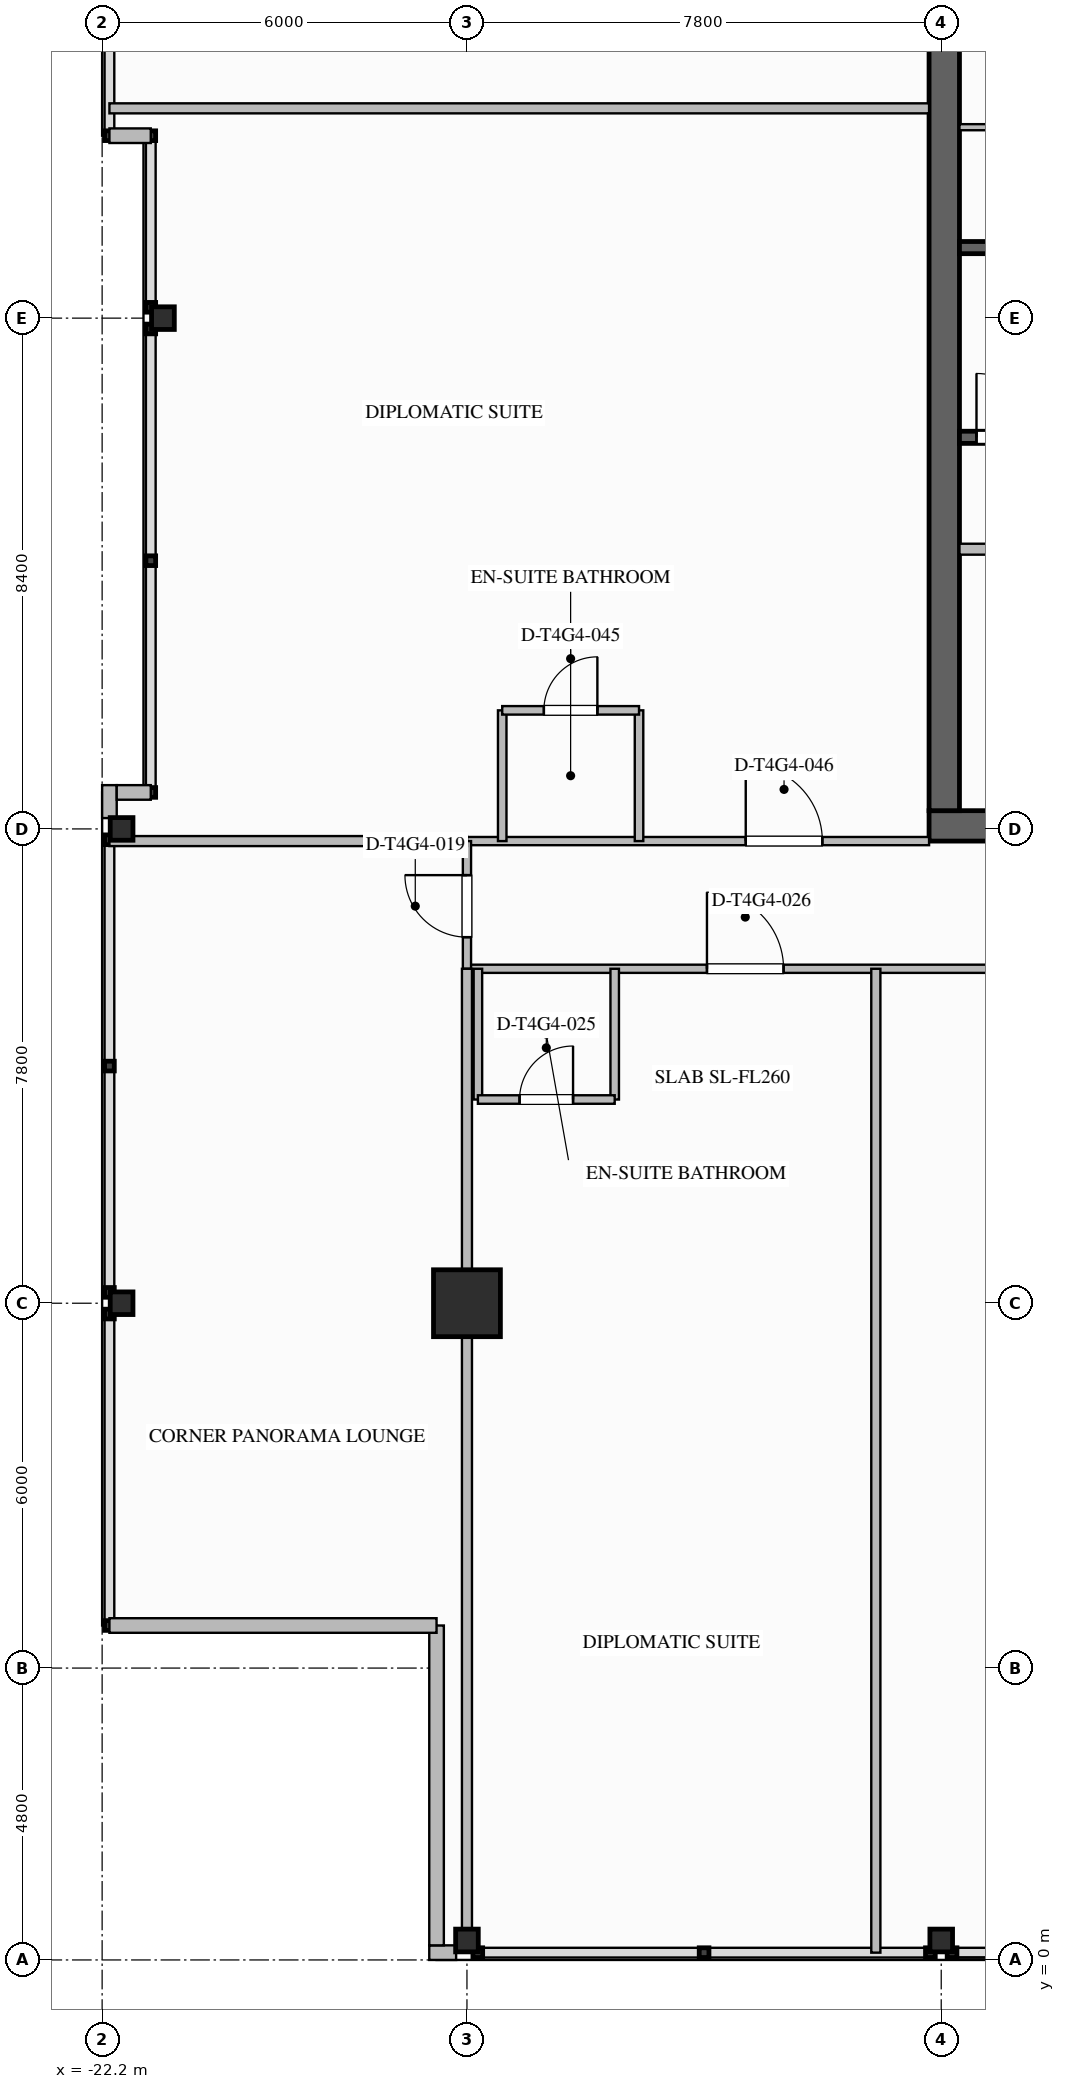
"""IFC4 building model, lengths in metres.
Left out: names, types, materials, properties, quantities, classifications, styles, units other than length and angle.
Written with IfcOpenShell. Run it as: python <this file> out.ifc"""

import sys

from ifc_helpers import new_model, si_unit, direction, frame, frame_2d, origin, origin_2d, place, context, subcontext, project, spatial, rectangle, i_section, extrude, element, fill, save


model = new_model("IFC4")
c1 = context("Model", 3, precision=1e-05, world=origin(), true_north=direction((0.0, 1.0)))
c2 = subcontext(c1, "Body", "Model", "MODEL_VIEW")
j1 = project(units=[si_unit("LENGTHUNIT", "METRE"), si_unit("PLANEANGLEUNIT", "RADIAN")], contexts=[c1])
p1 = place(None, origin())
s1 = spatial("IfcSite", under=j1, at=p1, CompositionType="ELEMENT")
p2 = place(p1, origin())
s2 = spatial("IfcBuilding", under=s1, at=p2, CompositionType="ELEMENT")
p3 = place(p2, frame((0.0, 0.0, 237.5)))
s3 = spatial("IfcBuildingStorey", under=s2, at=p3, CompositionType="ELEMENT", Elevation=237.5)
p4 = place(p3, frame((8.6, 18.65, 0.0), z_axis=(0.0, 0.0, 1.0), x_axis=(-1.0, 0.0, 0.0)))
e1 = element("IfcWall", 1, at=p4, inside=s3, PredefinedType="SHEAR", context=c2, shape_type="SweptSolid", body=[
    extrude(rectangle(XDim=17.2, YDim=0.5, at=frame_2d((8.6, 0.0))), origin(), (0.0, 0.0, 1.0), 3.6),
])
p5 = place(p3, frame((-8.35, 18.9, 0.0), z_axis=(0.0, 0.0, 1.0), x_axis=(0.0, 1.0, 0.0)))
e2 = element("IfcWall", 2, at=p5, inside=s3, PredefinedType="SHEAR", context=c2, shape_type="SweptSolid", body=[
    extrude(rectangle(XDim=16.2, YDim=0.5, at=frame_2d((8.1, 0.0))), origin(), (0.0, 0.0, 1.0), 3.6),
])
p6 = place(p3, frame((-16.2, 10.8, 0.0), z_axis=(0.0, 0.0, 1.0), x_axis=(1.0, 0.0, 0.0)))
e3 = element("IfcColumn", 3, at=p6, inside=s3, PredefinedType="COLUMN", context=c2, shape_type="SweptSolid", body=[
    extrude(rectangle(XDim=1.1, YDim=1.1, at=origin_2d()), origin(), (0.0, 0.0, 1.0), 3.6),
])
for number, where, z_axis, x_axis in (
    (4, (-21.88, 10.8, 0.0), (0.0, 0.0, 1.0), (1.0, 0.0, 0.0)),
    (5, (-21.88, 18.6, 0.0), (0.0, 0.0, 1.0), (1.0, 0.0, 0.0)),
    (6, (-21.2, 27.0, 0.0), (0.0, 0.0, 1.0), (1.0, 0.0, 0.0)),
    (7, (-16.2, 0.32, 0.0), (0.0, 0.0, 1.0), (0.0, 1.0, 0.0)),
    (8, (-8.4, 0.32, 0.0), (0.0, 0.0, 1.0), (0.0, 1.0, 0.0)),
):
    element("IfcColumn", number, at=place(p3, frame(where, z_axis=z_axis, x_axis=x_axis)), inside=s3, PredefinedType="COLUMN", context=c2, shape_type="SweptSolid", body=[
        extrude(i_section(OverallWidth=0.374, OverallDepth=0.372, WebThickness=0.016, FlangeThickness=0.026, FilletRadius=0.025, at=origin_2d()), origin(), (0.0, 0.0, 1.0), 3.597),
    ])
p7 = place(p3, frame((-22.08, 18.778, 0.0), z_axis=(0.0, 0.0, 1.0), x_axis=(0.0, 1.0, 0.0)))
e9 = element("IfcWall", 9, at=p7, inside=s3, PredefinedType="STANDARD", context=c2, shape_type="SweptSolid", body=[
    extrude(rectangle(XDim=0.542, YDim=0.24, at=frame_2d((0.271, 0.0))), origin(), (0.0, 0.0, 1.0), 3.34),
])
p8 = place(p3, frame((-16.378, 0.12, 0.0), z_axis=(0.0, 0.0, 1.0), x_axis=(-1.0, 0.0, 0.0)))
e10 = element("IfcWall", 10, at=p8, inside=s3, PredefinedType="STANDARD", context=c2, shape_type="SweptSolid", body=[
    extrude(rectangle(XDim=0.442, YDim=0.24, at=frame_2d((0.221, 0.0))), origin(), (0.0, 0.0, 1.0), 3.34),
])
p9 = place(p3, frame((-16.7, 0.24, 0.0), z_axis=(0.0, 0.0, 1.0), x_axis=(0.0, 1.0, 0.0)))
e11 = element("IfcWall", 11, at=p9, inside=s3, PredefinedType="STANDARD", context=c2, shape_type="SweptSolid", body=[
    extrude(rectangle(XDim=5.26, YDim=0.24, at=frame_2d((2.63, 0.0))), origin(), (0.0, 0.0, 1.0), 3.34),
])
p10 = place(p3, frame((-16.7, 5.5, 0.0), z_axis=(0.0, 0.0, 1.0), x_axis=(-1.0, 0.0, 0.0)))
e12 = element("IfcWall", 12, at=p10, inside=s3, PredefinedType="STANDARD", context=c2, shape_type="SweptSolid", body=[
    extrude(rectangle(XDim=5.38, YDim=0.24, at=frame_2d((2.69, 0.0))), origin(), (0.0, 0.0, 1.0), 3.34),
])
p11 = place(p3, frame((-21.96, 19.2, 0.0), z_axis=(0.0, 0.0, 1.0), x_axis=(1.0, 0.0, 0.0)))
e13 = element("IfcWall", 13, at=p11, inside=s3, PredefinedType="STANDARD", context=c2, shape_type="SweptSolid", body=[
    extrude(rectangle(XDim=0.56, YDim=0.24, at=frame_2d((0.28, 0.0))), origin(), (0.0, 0.0, 1.0), 3.34),
])
p12 = place(p3, frame((-21.4, 30.0, 0.0), z_axis=(0.0, 0.0, 1.0), x_axis=(-1.0, 0.0, 0.0)))
e14 = element("IfcWall", 14, at=p12, inside=s3, PredefinedType="STANDARD", context=c2, shape_type="SweptSolid", body=[
    extrude(rectangle(XDim=0.68, YDim=0.24, at=frame_2d((0.34, 0.0))), origin(), (0.0, 0.0, 1.0), 3.34),
])
p13 = place(p3, frame((-8.1, 25.04, 0.0), z_axis=(0.0, 0.0, 1.0), x_axis=(1.0, 0.0, 0.0)))
e15 = element("IfcWall", 15, at=p13, inside=s3, PredefinedType="SOLIDWALL", context=c2, shape_type="SweptSolid", body=[
    extrude(rectangle(XDim=8.1, YDim=0.2, at=frame_2d((4.05, 0.0))), origin(), (0.0, 0.0, 1.0), 3.34),
])
p14 = place(p13, frame((0.28, 0.0, 0.0)))
e16 = element("IfcOpeningElement", 16, at=p14, cuts=e15, PredefinedType="OPENING", context=c2, shape_type="SweptSolid", body=[
    extrude(rectangle(XDim=1.05, YDim=2.1, at=frame_2d((0.525, 1.05))), frame((0.0, 0.11, 0.0), z_axis=(0.0, -1.0, 0.0), x_axis=(1.0, 0.0, 0.0)), (0.0, 0.0, 1.0), 0.22),
])
p15 = place(p3, frame((-8.1, 28.16, 0.0), z_axis=(0.0, 0.0, 1.0), x_axis=(1.0, 0.0, 0.0)))
e17 = element("IfcWall", 17, at=p15, inside=s3, PredefinedType="SOLIDWALL", context=c2, shape_type="SweptSolid", body=[
    extrude(rectangle(XDim=8.1, YDim=0.2, at=frame_2d((4.05, 0.0))), origin(), (0.0, 0.0, 1.0), 3.34),
])
p16 = place(p3, frame((-8.1, 30.14, 0.0), z_axis=(0.0, 0.0, 1.0), x_axis=(1.0, 0.0, 0.0)))
e18 = element("IfcWall", 18, at=p16, inside=s3, PredefinedType="PARTITIONING", context=c2, shape_type="SweptSolid", body=[
    extrude(rectangle(XDim=7.1, YDim=0.1, at=frame_2d((3.55, 0.0))), origin(), (0.0, 0.0, 1.0), 3.34),
])
p17 = place(p16, frame((1.1, 0.0, 0.0)))
e19 = element("IfcOpeningElement", 19, at=p17, cuts=e18, PredefinedType="OPENING", context=c2, shape_type="SweptSolid", body=[
    extrude(rectangle(XDim=0.92, YDim=2.1, at=frame_2d((0.46, 1.05))), frame((0.0, 0.06, 0.0), z_axis=(0.0, -1.0, 0.0), x_axis=(1.0, 0.0, 0.0)), (0.0, 0.0, 1.0), 0.12),
])
p18 = place(p16, frame((4.6, 0.0, 0.0)))
e20 = element("IfcOpeningElement", 20, at=p18, cuts=e18, PredefinedType="OPENING", context=c2, shape_type="SweptSolid", body=[
    extrude(rectangle(XDim=0.92, YDim=2.1, at=frame_2d((0.46, 1.05))), frame((0.0, 0.06, 0.0), z_axis=(0.0, -1.0, 0.0), x_axis=(1.0, 0.0, 0.0)), (0.0, 0.0, 1.0), 0.12),
])
p19 = place(p3, frame((-8.1, 23.2, 0.0), z_axis=(0.0, 0.0, 1.0), x_axis=(1.0, 0.0, 0.0)))
e21 = element("IfcWall", 21, at=p19, inside=s3, PredefinedType="SOLIDWALL", context=c2, shape_type="SweptSolid", body=[
    extrude(rectangle(XDim=16.2, YDim=0.18, at=frame_2d((8.1, 0.0))), origin(), (0.0, 0.0, 1.0), 3.34),
])
p20 = place(p19, frame((1.8, 0.0, 0.0)))
e22 = element("IfcOpeningElement", 22, at=p20, cuts=e21, PredefinedType="OPENING", context=c2, shape_type="SweptSolid", body=[
    extrude(rectangle(XDim=1.0, YDim=2.1, at=frame_2d((0.5, 1.05))), frame((0.0, 0.1, 0.0), z_axis=(0.0, -1.0, 0.0), x_axis=(1.0, 0.0, 0.0)), (0.0, 0.0, 1.0), 0.2),
])
p21 = place(p19, frame((7.6, 0.0, 0.0)))
e23 = element("IfcOpeningElement", 23, at=p21, cuts=e21, PredefinedType="OPENING", context=c2, shape_type="SweptSolid", body=[
    extrude(rectangle(XDim=1.0, YDim=2.1, at=frame_2d((0.5, 1.05))), frame((0.0, 0.1, 0.0), z_axis=(0.0, -1.0, 0.0), x_axis=(1.0, 0.0, 0.0)), (0.0, 0.0, 1.0), 0.2),
])
p22 = place(p19, frame((13.0, 0.0, 0.0)))
e24 = element("IfcOpeningElement", 24, at=p22, cuts=e21, PredefinedType="OPENING", context=c2, shape_type="SweptSolid", body=[
    extrude(rectangle(XDim=1.0, YDim=2.1, at=frame_2d((0.5, 1.05))), frame((0.0, 0.1, 0.0), z_axis=(0.0, -1.0, 0.0), x_axis=(1.0, 0.0, 0.0)), (0.0, 0.0, 1.0), 0.2),
])
p23 = place(p3, frame((-16.2, 16.3, 0.0), z_axis=(0.0, 0.0, 1.0), x_axis=(1.0, 0.0, 0.0)))
e25 = element("IfcWall", 25, at=p23, inside=s3, PredefinedType="PARTITIONING", context=c2, shape_type="SweptSolid", body=[
    extrude(rectangle(XDim=38.28, YDim=0.135, at=frame_2d((19.14, 0.0))), origin(), (0.0, 0.0, 1.0), 3.34),
])
p24 = place(p23, frame((35.785, 0.0, 0.0)))
e26 = element("IfcOpeningElement", 26, at=p24, cuts=e25, PredefinedType="OPENING", context=c2, shape_type="SweptSolid", body=[
    extrude(rectangle(XDim=1.26, YDim=2.2, at=frame_2d((0.63, 1.1))), frame((0.0, 0.077, 0.0), z_axis=(0.0, -1.0, 0.0), x_axis=(1.0, 0.0, 0.0)), (0.0, 0.0, 1.0), 0.155),
])
p25 = place(p23, frame((3.947, 0.0, 0.0)))
e27 = element("IfcOpeningElement", 27, at=p25, cuts=e25, PredefinedType="OPENING", context=c2, shape_type="SweptSolid", body=[
    extrude(rectangle(XDim=1.26, YDim=2.2, at=frame_2d((0.63, 1.1))), frame((0.0, 0.077, 0.0), z_axis=(0.0, -1.0, 0.0), x_axis=(1.0, 0.0, 0.0)), (0.0, 0.0, 1.0), 0.155),
])
p26 = place(p23, frame((11.105, 0.0, 0.0)))
e28 = element("IfcOpeningElement", 28, at=p26, cuts=e25, PredefinedType="OPENING", context=c2, shape_type="SweptSolid", body=[
    extrude(rectangle(XDim=1.02, YDim=2.15, at=frame_2d((0.51, 1.075))), frame((0.0, 0.077, 0.0), z_axis=(0.0, -1.0, 0.0), x_axis=(1.0, 0.0, 0.0)), (0.0, 0.0, 1.0), 0.155),
])
p27 = place(p23, frame((20.453, 0.0, 0.0)))
e29 = element("IfcOpeningElement", 29, at=p27, cuts=e25, PredefinedType="OPENING", context=c2, shape_type="SweptSolid", body=[
    extrude(rectangle(XDim=1.26, YDim=2.2, at=frame_2d((0.63, 1.1))), frame((0.0, 0.077, 0.0), z_axis=(0.0, -1.0, 0.0), x_axis=(1.0, 0.0, 0.0)), (0.0, 0.0, 1.0), 0.155),
])
p28 = place(p23, frame((25.97, 0.0, 0.0)))
e30 = element("IfcOpeningElement", 30, at=p28, cuts=e25, PredefinedType="OPENING", context=c2, shape_type="SweptSolid", body=[
    extrude(rectangle(XDim=1.26, YDim=2.2, at=frame_2d((0.63, 1.1))), frame((0.0, 0.077, 0.0), z_axis=(0.0, -1.0, 0.0), x_axis=(1.0, 0.0, 0.0)), (0.0, 0.0, 1.0), 0.155),
])
p29 = place(p3, frame((-16.2, 18.4, 0.0), z_axis=(0.0, 0.0, 1.0), x_axis=(1.0, 0.0, 0.0)))
e31 = element("IfcWall", 31, at=p29, inside=s3, PredefinedType="PARTITIONING", context=c2, shape_type="SweptSolid", body=[
    extrude(rectangle(XDim=7.6, YDim=0.135, at=frame_2d((3.8, 0.0))), origin(), (0.0, 0.0, 1.0), 2.717),
])
p30 = place(p29, frame((4.585, 0.0, 0.0)))
e32 = element("IfcOpeningElement", 32, at=p30, cuts=e31, PredefinedType="OPENING", context=c2, shape_type="SweptSolid", body=[
    extrude(rectangle(XDim=1.26, YDim=2.2, at=frame_2d((0.63, 1.1))), frame((0.0, 0.077, 0.0), z_axis=(0.0, -1.0, 0.0), x_axis=(1.0, 0.0, 0.0)), (0.0, 0.0, 1.0), 0.155),
])
p31 = place(p3, frame((-16.2, 16.3, 0.0), z_axis=(0.0, 0.0, 1.0), x_axis=(0.0, 1.0, 0.0)))
e33 = element("IfcWall", 33, at=p31, inside=s3, PredefinedType="PARTITIONING", context=c2, shape_type="SweptSolid", body=[
    extrude(rectangle(XDim=2.1, YDim=0.135, at=frame_2d((1.05, 0.0))), origin(), (0.0, 0.0, 1.0), 2.714),
])
p32 = place(p31, frame((0.52, 0.0, 0.0)))
e34 = element("IfcOpeningElement", 34, at=p32, cuts=e33, PredefinedType="OPENING", context=c2, shape_type="SweptSolid", body=[
    extrude(rectangle(XDim=1.02, YDim=2.15, at=frame_2d((0.51, 1.075))), frame((0.0, 0.077, 0.0), z_axis=(0.0, -1.0, 0.0), x_axis=(1.0, 0.0, 0.0)), (0.0, 0.0, 1.0), 0.155),
])
p33 = place(p3, frame((-16.2, 0.12, 0.0), z_axis=(0.0, 0.0, 1.0), x_axis=(0.0, 1.0, 0.0)))
e35 = element("IfcWall", 35, at=p33, inside=s3, PredefinedType="PARTITIONING", context=c2, shape_type="SweptSolid", body=[
    extrude(rectangle(XDim=16.18, YDim=0.165, at=frame_2d((8.09, 0.0))), origin(), (0.0, 0.0, 1.0), 2.714),
])
p34 = place(p3, frame((-22.08, 18.4, 0.0), z_axis=(0.0, 0.0, 1.0), x_axis=(1.0, 0.0, 0.0)))
e36 = element("IfcWall", 36, at=p34, inside=s3, PredefinedType="PARTITIONING", context=c2, shape_type="SweptSolid", body=[
    extrude(rectangle(XDim=5.88, YDim=0.165, at=frame_2d((2.94, 0.0))), origin(), (0.0, 0.0, 1.0), 2.714),
])
p35 = place(p3, frame((-16.02, 16.3, 0.0), z_axis=(0.0, 0.0, 1.0), x_axis=(0.0, -1.0, 0.0)))
e37 = element("IfcWall", 37, at=p35, inside=s3, PredefinedType="PLUMBINGWALL", context=c2, shape_type="SweptSolid", body=[
    extrude(rectangle(XDim=2.15, YDim=0.14, at=frame_2d((1.075, 0.0))), origin(), (0.0, 0.0, 1.0), 2.714),
])
p36 = place(p3, frame((-13.77, 16.3, 0.0), z_axis=(0.0, 0.0, 1.0), x_axis=(0.0, -1.0, 0.0)))
e38 = element("IfcWall", 38, at=p36, inside=s3, PredefinedType="PLUMBINGWALL", context=c2, shape_type="SweptSolid", body=[
    extrude(rectangle(XDim=2.15, YDim=0.14, at=frame_2d((1.075, 0.0))), origin(), (0.0, 0.0, 1.0), 3.34),
])
p37 = place(p3, frame((-16.02, 14.15, 0.0), z_axis=(0.0, 0.0, 1.0), x_axis=(1.0, 0.0, 0.0)))
e39 = element("IfcWall", 39, at=p37, inside=s3, PredefinedType="PLUMBINGWALL", context=c2, shape_type="SweptSolid", body=[
    extrude(rectangle(XDim=2.25, YDim=0.14, at=frame_2d((1.125, 0.0))), origin(), (0.0, 0.0, 1.0), 3.34),
])
p38 = place(p37, frame((0.685, 0.0, 0.0)))
e40 = element("IfcOpeningElement", 40, at=p38, cuts=e39, PredefinedType="OPENING", context=c2, shape_type="SweptSolid", body=[
    extrude(rectangle(XDim=0.88, YDim=2.1, at=frame_2d((0.44, 1.05))), frame((0.0, 0.08, 0.0), z_axis=(0.0, -1.0, 0.0), x_axis=(1.0, 0.0, 0.0)), (0.0, 0.0, 1.0), 0.16),
])
p39 = place(p3, frame((-9.476, 0.12, 0.0), z_axis=(0.0, 0.0, 1.0), x_axis=(0.0, 1.0, 0.0)))
e41 = element("IfcWall", 41, at=p39, inside=s3, PredefinedType="PARTITIONING", context=c2, shape_type="SweptSolid", body=[
    extrude(rectangle(XDim=16.18, YDim=0.15, at=frame_2d((8.09, 0.0))), origin(), (0.0, 0.0, 1.0), 3.34),
])
p40 = place(p3, frame((-22.08, 30.45, 0.0), z_axis=(0.0, 0.0, 1.0), x_axis=(1.0, 0.0, 0.0)))
e42 = element("IfcWall", 42, at=p40, inside=s3, PredefinedType="PARTITIONING", context=c2, shape_type="SweptSolid", body=[
    extrude(rectangle(XDim=13.48, YDim=0.165, at=frame_2d((6.74, 0.0))), origin(), (0.0, 0.0, 1.0), 3.34),
])
for number, where, z_axis, x_axis in (
    (43, (-15.62, 18.4, 0.0), (0.0, 0.0, 1.0), (0.0, 1.0, 0.0)),
    (44, (-13.37, 18.4, 0.0), (0.0, 0.0, 1.0), (0.0, 1.0, 0.0)),
):
    element("IfcWall", number, at=place(p3, frame(where, z_axis=z_axis, x_axis=x_axis)), inside=s3, PredefinedType="PLUMBINGWALL", context=c2, shape_type="SweptSolid", body=[
        extrude(rectangle(XDim=2.15, YDim=0.14, at=frame_2d((1.075, 0.0))), origin(), (0.0, 0.0, 1.0), 3.34),
    ])
p41 = place(p3, frame((-15.62, 20.55, 0.0), z_axis=(0.0, 0.0, 1.0), x_axis=(1.0, 0.0, 0.0)))
e45 = element("IfcWall", 45, at=p41, inside=s3, PredefinedType="PLUMBINGWALL", context=c2, shape_type="SweptSolid", body=[
    extrude(rectangle(XDim=2.25, YDim=0.14, at=frame_2d((1.125, 0.0))), origin(), (0.0, 0.0, 1.0), 3.34),
])
p42 = place(p41, frame((0.685, 0.0, 0.0)))
e46 = element("IfcOpeningElement", 46, at=p42, cuts=e45, PredefinedType="OPENING", context=c2, shape_type="SweptSolid", body=[
    extrude(rectangle(XDim=0.88, YDim=2.1, at=frame_2d((0.44, 1.05))), frame((0.0, 0.08, 0.0), z_axis=(0.0, -1.0, 0.0), x_axis=(1.0, 0.0, 0.0)), (0.0, 0.0, 1.0), 0.16),
])
p43 = place(p14, origin())
e47 = element("IfcDoor", 47, at=p43, inside=s3, OperationType="SINGLE_SWING_LEFT", PredefinedType="DOOR", context=c2, shape_type="SweptSolid", body=[
    extrude(rectangle(XDim=1.05, YDim=2.1, at=frame_2d((0.525, 1.05))), frame((0.0, 0.025, 0.0), z_axis=(0.0, -1.0, 0.0), x_axis=(1.0, 0.0, 0.0)), (0.0, 0.0, 1.0), 0.05),
])
fill(e16, e47)
p44 = place(p32, origin())
e48 = element("IfcDoor", 48, at=p44, inside=s3, OperationType="SINGLE_SWING_RIGHT", PredefinedType="DOOR", context=c2, shape_type="SweptSolid", body=[
    extrude(rectangle(XDim=1.02, YDim=2.15, at=frame_2d((0.51, 1.075))), frame((0.0, 0.025, 0.0), z_axis=(0.0, -1.0, 0.0), x_axis=(1.0, 0.0, 0.0)), (0.0, 0.0, 1.0), 0.05),
])
fill(e34, e48)
p45 = place(p38, origin())
e49 = element("IfcDoor", 49, at=p45, inside=s3, OperationType="SINGLE_SWING_RIGHT", PredefinedType="DOOR", context=c2, shape_type="SweptSolid", body=[
    extrude(rectangle(XDim=0.88, YDim=2.1, at=frame_2d((0.44, 1.05))), frame((0.0, 0.025, 0.0), z_axis=(0.0, -1.0, 0.0), x_axis=(1.0, 0.0, 0.0)), (0.0, 0.0, 1.0), 0.05),
])
fill(e40, e49)
p46 = place(p25, origin())
e50 = element("IfcDoor", 50, at=p46, inside=s3, OperationType="SINGLE_SWING_LEFT", PredefinedType="DOOR", context=c2, shape_type="SweptSolid", body=[
    extrude(rectangle(XDim=1.26, YDim=2.2, at=frame_2d((0.63, 1.1))), frame((0.0, 0.025, 0.0), z_axis=(0.0, -1.0, 0.0), x_axis=(1.0, 0.0, 0.0)), (0.0, 0.0, 1.0), 0.05),
])
fill(e27, e50)
p47 = place(p42, origin())
e51 = element("IfcDoor", 51, at=p47, inside=s3, OperationType="SINGLE_SWING_RIGHT", PredefinedType="DOOR", context=c2, shape_type="SweptSolid", body=[
    extrude(rectangle(XDim=0.88, YDim=2.1, at=frame_2d((0.44, 1.05))), frame((0.0, 0.025, 0.0), z_axis=(0.0, -1.0, 0.0), x_axis=(1.0, 0.0, 0.0)), (0.0, 0.0, 1.0), 0.05),
])
fill(e46, e51)
p48 = place(p30, origin())
e52 = element("IfcDoor", 52, at=p48, inside=s3, OperationType="SINGLE_SWING_LEFT", PredefinedType="DOOR", context=c2, shape_type="SweptSolid", body=[
    extrude(rectangle(XDim=1.26, YDim=2.2, at=frame_2d((0.63, 1.1))), frame((0.0, 0.025, 0.0), z_axis=(0.0, -1.0, 0.0), x_axis=(1.0, 0.0, 0.0)), (0.0, 0.0, 1.0), 0.05),
])
fill(e32, e52)
save(model, sys.argv[1])
